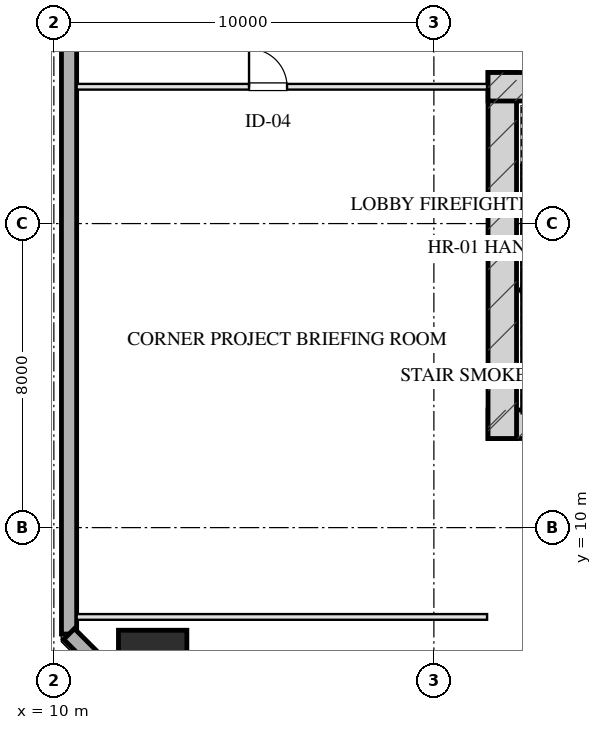
"""IFC4 building model, lengths in metres.
Left out: names, types, materials, properties, quantities, classifications, styles, units other than length and angle.
Written with IfcOpenShell. Run it as: python <this file> out.ifc"""

import sys

from ifc_helpers import new_model, si_unit, direction, frame, frame_2d, origin, origin_2d, place, context, subcontext, project, spatial, rectangle, hollow_rectangle, extrude, element, fill, save


model = new_model("IFC4")
c1 = context("Model", 3, precision=1e-05, world=origin(), true_north=direction((0.0, 1.0)))
c2 = subcontext(c1, "Body", "Model", "MODEL_VIEW")
j1 = project(units=[si_unit("LENGTHUNIT", "METRE"), si_unit("PLANEANGLEUNIT", "RADIAN")], contexts=[c1])
p1 = place(None, origin())
s1 = spatial("IfcSite", under=j1, at=p1, CompositionType="ELEMENT")
p2 = place(p1, origin())
s2 = spatial("IfcBuilding", under=s1, at=p2, CompositionType="ELEMENT")
p3 = place(p2, frame((0.0, 0.0, 38.0)))
s3 = spatial("IfcBuildingStorey", under=s2, at=p3, CompositionType="ELEMENT", Elevation=38.0)
p4 = place(p3, frame((21.425, 12.72, 0.0), z_axis=(0.0, 0.0, 1.0), x_axis=(1.0, 0.0, 0.0)))
e1 = element("IfcWall", 1, at=p4, inside=s3, PredefinedType="SHEAR", context=c2, shape_type="SweptSolid", body=[
    extrude(rectangle(XDim=17.15, YDim=0.75, at=frame_2d((8.575, 0.0))), origin(), (0.0, 0.0, 1.0), 4.0),
])
p5 = place(p3, frame((21.8, 21.975, 0.0), z_axis=(0.0, 0.0, 1.0), x_axis=(0.0, -1.0, 0.0)))
e2 = element("IfcWall", 2, at=p5, inside=s3, PredefinedType="SHEAR", context=c2, shape_type="SweptSolid", body=[
    extrude(rectangle(XDim=9.63, YDim=0.75, at=frame_2d((4.815, 0.0))), origin(), (0.0, 0.0, 1.0), 4.0),
])
p6 = place(p3, frame((21.425, 21.6, 0.0), z_axis=(0.0, 0.0, 1.0), x_axis=(1.0, 0.0, 0.0)))
e3 = element("IfcWall", 3, at=p6, inside=s3, PredefinedType="SHEAR", context=c2, shape_type="SweptSolid", body=[
    extrude(rectangle(XDim=4.295, YDim=0.75, at=frame_2d((2.147, 0.0))), origin(), (0.0, 0.0, 1.0), 4.0),
])
p7 = place(p3, frame((12.6, 6.4, 0.0), z_axis=(0.0, 0.0, 1.0), x_axis=(1.0, 0.0, 0.0)))
e4 = element("IfcColumn", 4, at=p7, inside=s3, PredefinedType="COLUMN", context=c2, shape_type="SweptSolid", body=[
    extrude(hollow_rectangle(XDim=1.8, YDim=1.8, WallThickness=0.06, at=origin_2d()), origin(), (0.0, 0.0, 1.0), 4.001),
])
p8 = place(p3, frame((10.4, 7.2, 0.0), z_axis=(0.0, 0.0, 1.0), x_axis=(0.0, 1.0, 0.0)))
e5 = element("IfcWall", 5, at=p8, inside=s3, PredefinedType="SOLIDWALL", context=c2, shape_type="SweptSolid", body=[
    extrude(rectangle(XDim=53.6, YDim=0.4, at=frame_2d((26.8, 0.0))), origin(), (0.0, 0.0, 1.0), 3.16),
])
p9 = place(p8, frame((28.15, 0.0, 0.75)))
e6 = element("IfcOpeningElement", 6, at=p9, cuts=e5, PredefinedType="OPENING", context=c2, shape_type="SweptSolid", body=[
    extrude(rectangle(XDim=2.5, YDim=1.75, at=frame_2d((1.25, 0.875))), frame((0.0, 0.21, 0.0), z_axis=(0.0, -1.0, 0.0), x_axis=(1.0, 0.0, 0.0)), (0.0, 0.0, 1.0), 0.42),
])
p10 = place(p8, frame((20.45, 0.0, 0.0)))
e7 = element("IfcOpeningElement", 7, at=p10, cuts=e5, PredefinedType="OPENING", context=c2, shape_type="SweptSolid", body=[
    extrude(rectangle(XDim=1.1, YDim=2.15, at=frame_2d((0.55, 1.075))), frame((0.0, 0.21, 0.0), z_axis=(0.0, -1.0, 0.0), x_axis=(1.0, 0.0, 0.0)), (0.0, 0.0, 1.0), 0.42),
])
p11 = place(p3, frame((13.4, 4.2, 0.0), z_axis=(0.0, 0.0, 1.0), x_axis=(-0.707106781187, 0.707106781187, 0.0)))
e8 = element("IfcWall", 8, at=p11, inside=s3, PredefinedType="SOLIDWALL", context=c2, shape_type="SweptSolid", body=[
    extrude(rectangle(XDim=4.243, YDim=0.4, at=frame_2d((2.121, 0.0))), origin(), (0.0, 0.0, 1.0), 3.16),
])
p12 = place(p3, frame((10.6, 7.65, 0.0), z_axis=(0.0, 0.0, 1.0), x_axis=(1.0, 0.0, 0.0)))
e9 = element("IfcWall", 9, at=p12, inside=s3, PredefinedType="PARTITIONING", context=c2, shape_type="SweptSolid", body=[
    extrude(rectangle(XDim=10.8, YDim=0.15, at=frame_2d((5.4, 0.0))), origin(), (0.0, 0.0, 1.0), 3.725),
])
p13 = place(p3, frame((10.6, 21.6, 0.0), z_axis=(0.0, 0.0, 1.0), x_axis=(1.0, 0.0, 0.0)))
e10 = element("IfcWall", 10, at=p13, inside=s3, PredefinedType="PARTITIONING", context=c2, shape_type="SweptSolid", body=[
    extrude(rectangle(XDim=10.8, YDim=0.15, at=frame_2d((5.4, 0.0))), origin(), (0.0, 0.0, 1.0), 3.725),
])
p14 = place(p13, frame((4.536, 0.0, 0.0)))
e11 = element("IfcOpeningElement", 11, at=p14, cuts=e10, PredefinedType="OPENING", context=c2, shape_type="SweptSolid", body=[
    extrude(rectangle(XDim=1.0, YDim=2.05, at=frame_2d((0.5, 1.025))), frame((0.0, 0.085, 0.0), z_axis=(0.0, -1.0, 0.0), x_axis=(1.0, 0.0, 0.0)), (0.0, 0.0, 1.0), 0.17),
])
p15 = place(p14, origin())
e12 = element("IfcDoor", 12, at=p15, inside=s3, OperationType="SINGLE_SWING_LEFT", PredefinedType="DOOR", context=c2, shape_type="SweptSolid", body=[
    extrude(rectangle(XDim=1.0, YDim=2.05, at=frame_2d((0.5, 1.025))), frame((0.0, 0.025, 0.0), z_axis=(0.0, -1.0, 0.0), x_axis=(1.0, 0.0, 0.0)), (0.0, 0.0, 1.0), 0.05),
])
fill(e11, e12)
save(model, sys.argv[1])
